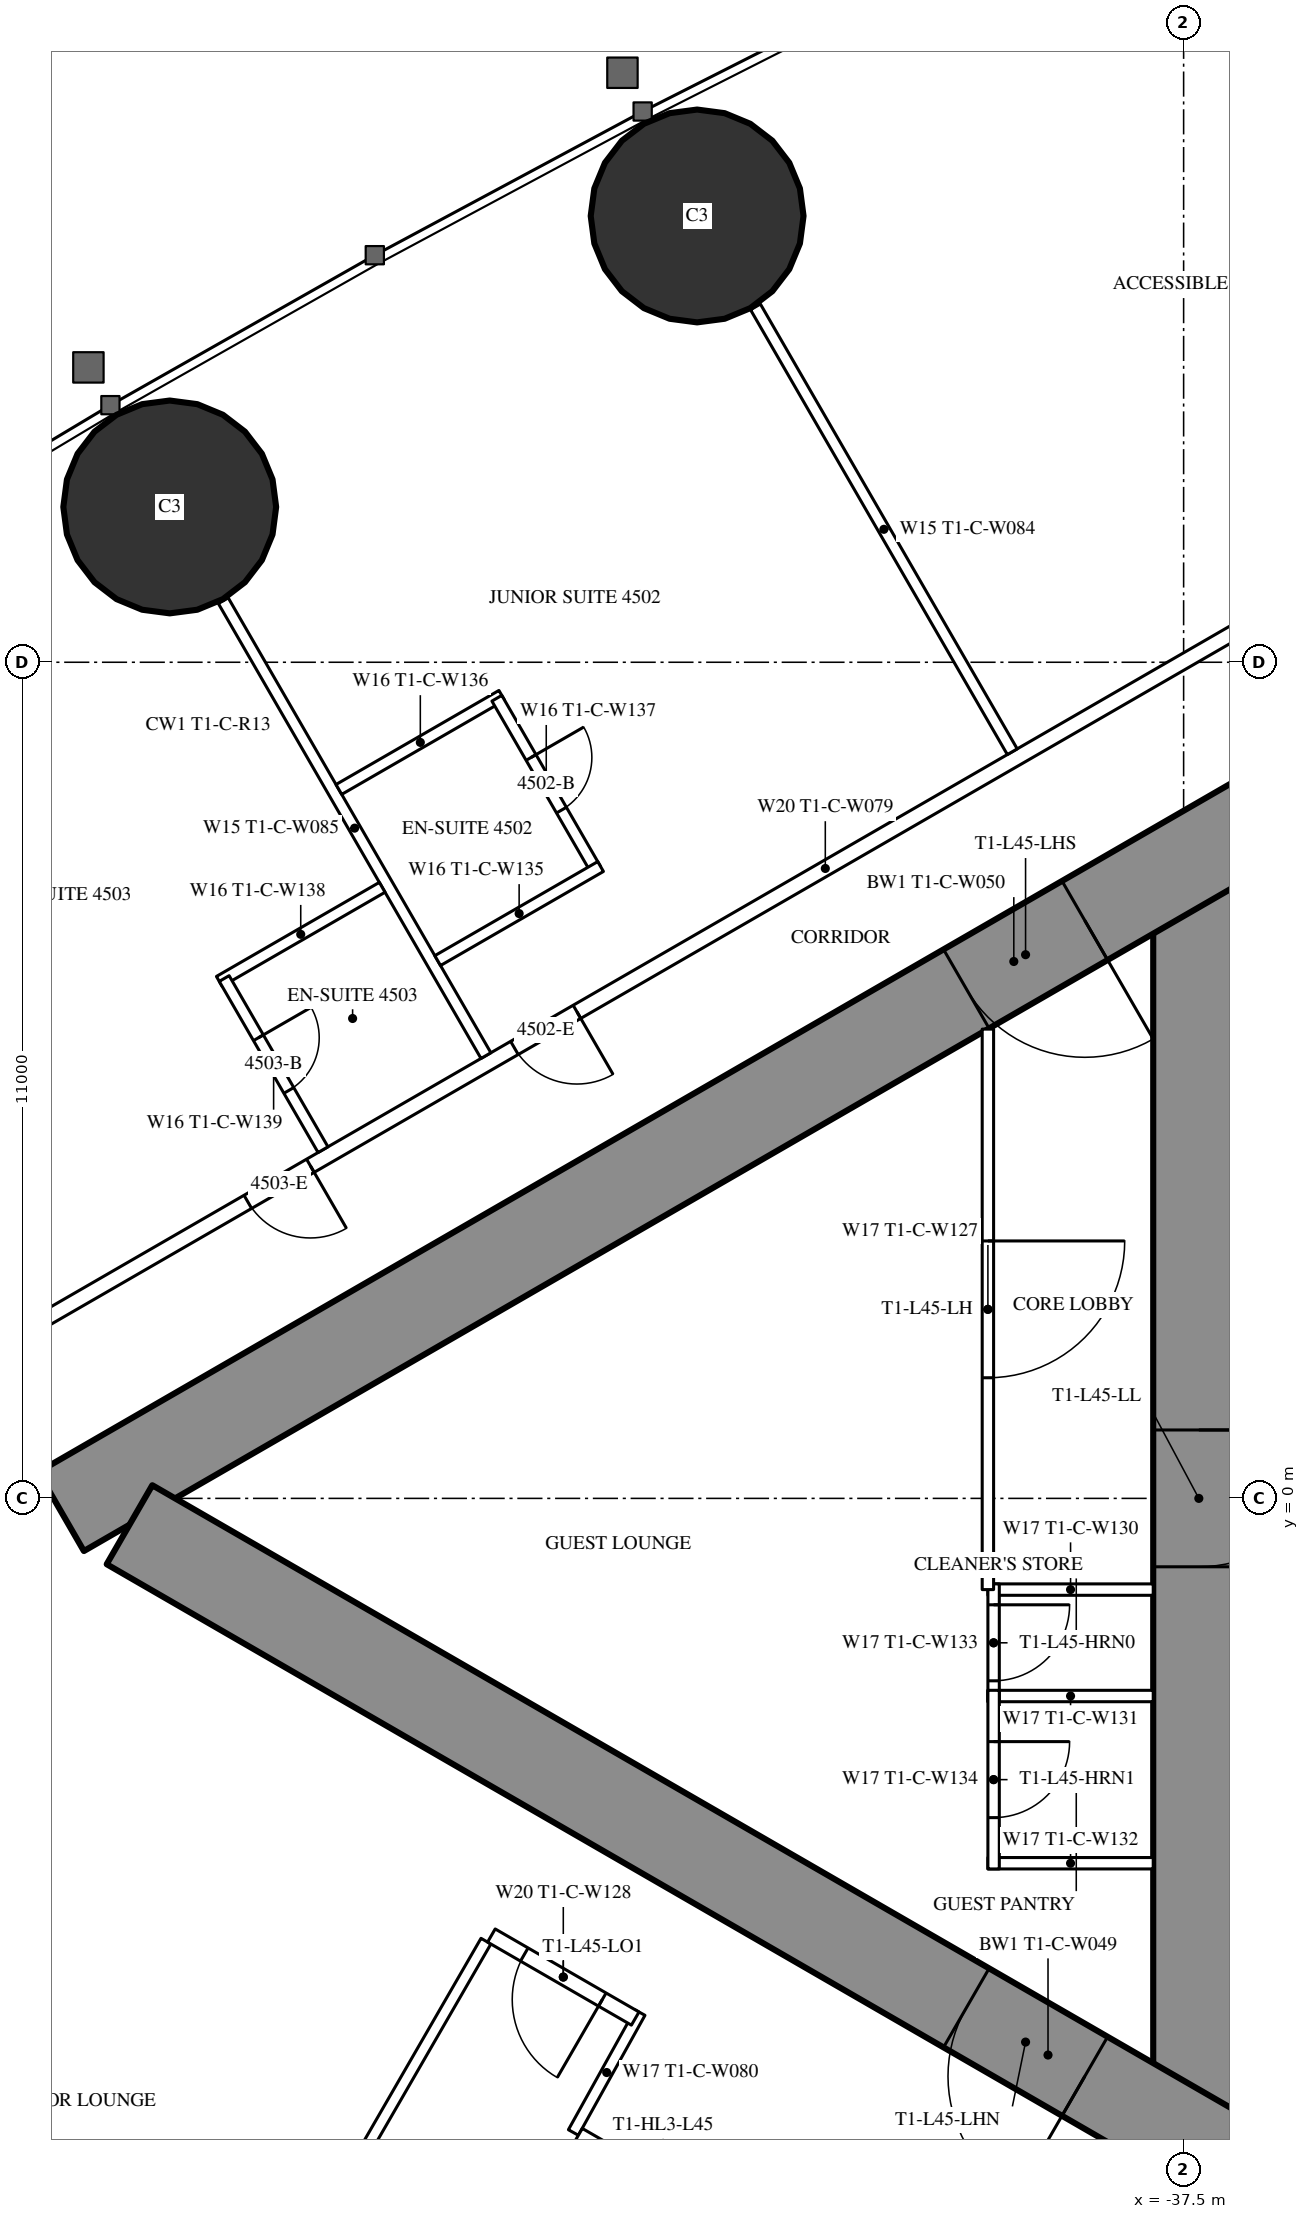
"""IFC4 building model, lengths in metres.
Left out: names, types, materials, properties, quantities, classifications, styles, units other than length and angle.
Written with IfcOpenShell. Run it as: python <this file> out.ifc"""

import sys

from ifc_helpers import new_model, si_unit, direction, frame, frame_2d, origin, origin_2d, place, context, subcontext, project, spatial, rectangle, circle, extrude, element, fill, save


model = new_model("IFC4")
c1 = context("Model", 3, precision=1e-05, world=origin(), true_north=direction((0.0, 1.0)))
c2 = subcontext(c1, "Body", "Model", "MODEL_VIEW")
j1 = project(units=[si_unit("LENGTHUNIT", "METRE"), si_unit("PLANEANGLEUNIT", "RADIAN")], contexts=[c1])
p1 = place(None, origin())
s1 = spatial("IfcSite", under=j1, at=p1, CompositionType="ELEMENT")
p2 = place(p1, origin())
s2 = spatial("IfcBuilding", under=s1, at=p2, CompositionType="ELEMENT")
p3 = place(p2, frame((0.0, 0.0, 170.3)))
s3 = spatial("IfcBuildingStorey", under=s2, at=p3, CompositionType="ELEMENT", Elevation=170.3)
for number, where, z_axis, x_axis in (
    (1, (-43.9, 16.871, 0.0), (0.0, 0.0, 1.0), (1.0, 0.0, 0.0)),
    (2, (-50.839, 13.043, 0.0), (0.0, 0.0, 1.0), (1.0, 0.0, 0.0)),
):
    element("IfcColumn", number, at=place(p3, frame(where, z_axis=z_axis, x_axis=x_axis)), inside=s3, PredefinedType="COLUMN", context=c2, shape_type="SweptSolid", body=[
        extrude(circle(Radius=1.4, at=origin_2d()), origin(), (0.0, 0.0, 1.0), 3.5),
    ])
p4 = place(p3, frame((-37.3, 8.6, 0.0), z_axis=(0.0, 0.0, 1.0), x_axis=(0.0, -1.0, 0.0)))
e3 = element("IfcWall", 3, at=p4, inside=s3, PredefinedType="SHEAR", context=c2, shape_type="SweptSolid", body=[
    extrude(rectangle(XDim=17.2, YDim=1.2, at=frame_2d((8.6, 0.0))), origin(), (0.0, 0.0, 1.0), 3.5),
])
p5 = place(p4, frame((7.7, 0.0, 0.0)))
e4 = element("IfcOpeningElement", 4, at=p5, cuts=e3, PredefinedType="OPENING", context=c2, shape_type="SweptSolid", body=[
    extrude(rectangle(XDim=1.8, YDim=2.2, at=frame_2d((0.9, 1.1))), frame((0.0, 0.61, 0.0), z_axis=(0.0, -1.0, 0.0), x_axis=(1.0, 0.0, 0.0)), (0.0, 0.0, 1.0), 1.22),
])
p6 = place(p3, frame((-27.2, 14.3, 0.0), z_axis=(0.0, 0.0, 1.0), x_axis=(-0.866026593062, -0.499997940104, 0.0)))
e5 = element("IfcWall", 5, at=p6, inside=s3, PredefinedType="SHEAR", context=c2, shape_type="SweptSolid", body=[
    extrude(rectangle(XDim=28.946, YDim=1.2, at=frame_2d((14.473, 0.0))), origin(), (0.0, 0.0, 1.0), 3.5),
])
p7 = place(p6, frame((4.6, 0.0, 0.0)))
e6 = element("IfcOpeningElement", 6, at=p7, cuts=e5, PredefinedType="OPENING", context=c2, shape_type="SweptSolid", body=[
    extrude(rectangle(XDim=1.0, YDim=2.2, at=frame_2d((0.5, 1.1))), frame((0.0, 0.61, 0.0), z_axis=(0.0, -1.0, 0.0), x_axis=(1.0, 0.0, 0.0)), (0.0, 0.0, 1.0), 1.22),
])
p8 = place(p6, frame((13.395, 0.0, 0.0)))
e7 = element("IfcOpeningElement", 7, at=p8, cuts=e5, PredefinedType="OPENING", context=c2, shape_type="SweptSolid", body=[
    extrude(rectangle(XDim=1.8, YDim=2.2, at=frame_2d((0.9, 1.1))), frame((0.0, 0.61, 0.0), z_axis=(0.0, -1.0, 0.0), x_axis=(1.0, 0.0, 0.0)), (0.0, 0.0, 1.0), 1.22),
])
p9 = place(p3, frame((-27.2, -14.3, 0.0), z_axis=(0.0, 0.0, 1.0), x_axis=(-0.866024021859, 0.500002393557, 0.0)))
e8 = element("IfcWall", 8, at=p9, inside=s3, PredefinedType="SHEAR", context=c2, shape_type="SweptSolid", body=[
    extrude(rectangle(XDim=27.907, YDim=1.2, at=frame_2d((13.954, 0.0))), origin(), (0.0, 0.0, 1.0), 3.5),
])
p10 = place(p9, frame((4.6, 0.0, 0.0)))
e9 = element("IfcOpeningElement", 9, at=p10, cuts=e8, PredefinedType="OPENING", context=c2, shape_type="SweptSolid", body=[
    extrude(rectangle(XDim=1.0, YDim=2.2, at=frame_2d((0.5, 1.1))), frame((0.0, 0.61, 0.0), z_axis=(0.0, -1.0, 0.0), x_axis=(1.0, 0.0, 0.0)), (0.0, 0.0, 1.0), 1.22),
])
p11 = place(p9, frame((13.395, 0.0, 0.0)))
e10 = element("IfcOpeningElement", 10, at=p11, cuts=e8, PredefinedType="OPENING", context=c2, shape_type="SweptSolid", body=[
    extrude(rectangle(XDim=1.8, YDim=2.2, at=frame_2d((0.9, 1.1))), frame((0.0, 0.61, 0.0), z_axis=(0.0, -1.0, 0.0), x_axis=(1.0, 0.0, 0.0)), (0.0, 0.0, 1.0), 1.22),
])
p12 = place(p3, frame((-27.86, 16.575, 0.0), z_axis=(0.0, 0.0, 1.0), x_axis=(-0.866025533911, -0.499999774615, 0.0)))
e11 = element("IfcWall", 11, at=p12, inside=s3, PredefinedType="PARTITIONING", context=c2, shape_type="SweptSolid", body=[
    extrude(rectangle(XDim=33.149, YDim=0.2, at=frame_2d((16.575, 0.0))), origin(), (0.0, 0.0, 1.0), 3.25),
])
p13 = place(p12, frame((3.75, 0.0, 0.0)))
e12 = element("IfcOpeningElement", 12, at=p13, cuts=e11, PredefinedType="OPENING", context=c2, shape_type="SweptSolid", body=[
    extrude(rectangle(XDim=1.0, YDim=2.2, at=frame_2d((0.5, 1.1))), frame((0.0, 0.11, 0.0), z_axis=(0.0, -1.0, 0.0), x_axis=(1.0, 0.0, 0.0)), (0.0, 0.0, 1.0), 0.22),
])
p14 = place(p12, frame((20.347, 0.0, 0.0)))
e13 = element("IfcOpeningElement", 13, at=p14, cuts=e11, PredefinedType="OPENING", context=c2, shape_type="SweptSolid", body=[
    extrude(rectangle(XDim=0.95, YDim=2.2, at=frame_2d((0.475, 1.1))), frame((0.0, 0.11, 0.0), z_axis=(0.0, -1.0, 0.0), x_axis=(1.0, 0.0, 0.0)), (0.0, 0.0, 1.0), 0.22),
])
p15 = place(p12, frame((24.397, 0.0, 0.0)))
e14 = element("IfcOpeningElement", 14, at=p15, cuts=e11, PredefinedType="OPENING", context=c2, shape_type="SweptSolid", body=[
    extrude(rectangle(XDim=0.95, YDim=2.2, at=frame_2d((0.475, 1.1))), frame((0.0, 0.11, 0.0), z_axis=(0.0, -1.0, 0.0), x_axis=(1.0, 0.0, 0.0)), (0.0, 0.0, 1.0), 0.22),
])
p16 = place(p12, frame((30.042, 0.0, 0.0)))
e15 = element("IfcOpeningElement", 15, at=p16, cuts=e11, PredefinedType="OPENING", context=c2, shape_type="SweptSolid", body=[
    extrude(rectangle(XDim=0.95, YDim=2.2, at=frame_2d((0.475, 1.1))), frame((0.0, 0.11, 0.0), z_axis=(0.0, -1.0, 0.0), x_axis=(1.0, 0.0, 0.0)), (0.0, 0.0, 1.0), 0.22),
])
p17 = place(p3, frame((-39.754, 9.823, 0.0), z_axis=(0.0, 0.0, 1.0), x_axis=(-0.499997670926, 0.866026748472, 0.0)))
e16 = element("IfcWall", 16, at=p17, inside=s3, PredefinedType="PARTITIONING", context=c2, shape_type="SweptSolid", body=[
    extrude(rectangle(XDim=6.757, YDim=0.15, at=frame_2d((3.379, 0.0))), origin(), (0.0, 0.0, 1.0), 2.3),
])
for number, where, z_axis, x_axis in (
    (17, (-46.679, 5.825, 0.0), (0.0, 0.0, 1.0), (-0.5, 0.866, 0.0)),
    (18, (-46.679, -5.825, 0.0), (0.0, 0.0, 1.0), (-0.5, -0.866, 0.0)),
):
    element("IfcWall", number, at=place(p3, frame(where, z_axis=z_axis, x_axis=x_axis)), inside=s3, PredefinedType="PARTITIONING", context=c2, shape_type="SweptSolid", body=[
        extrude(rectangle(XDim=6.911, YDim=0.15, at=frame_2d((3.456, 0.0))), origin(), (0.0, 0.0, 1.0), 2.3),
    ])
p18 = place(p3, frame((-44.652, -6.764, 0.0), z_axis=(0.0, 0.0, 1.0), x_axis=(-0.485424724123, -0.874278466629, 0.0)))
e19 = element("IfcWall", 19, at=p18, inside=s3, PredefinedType="PARTITIONING", context=c2, shape_type="SweptSolid", body=[
    extrude(rectangle(XDim=1.805, YDim=0.15, at=frame_2d((0.903, 0.0))), origin(), (0.0, 0.0, 1.0), 3.25),
])
p19 = place(p3, frame((-44.715, -6.844, 0.0), z_axis=(0.0, 0.0, 1.0), x_axis=(-0.865999496279, 0.500044870432, 0.0)))
e20 = element("IfcWall", 20, at=p19, inside=s3, PredefinedType="PARTITIONING", context=c2, shape_type="SweptSolid", body=[
    extrude(rectangle(XDim=2.185, YDim=0.2, at=frame_2d((1.092, 0.0))), origin(), (0.0, 0.0, 1.0), 3.25),
])
p20 = place(p19, frame((0.5, 0.0, 0.0)))
e21 = element("IfcOpeningElement", 21, at=p20, cuts=e20, PredefinedType="OPENING", context=c2, shape_type="SweptSolid", body=[
    extrude(rectangle(XDim=1.185, YDim=2.2, at=frame_2d((0.593, 1.1))), frame((0.0, 0.11, 0.0), z_axis=(0.0, -1.0, 0.0), x_axis=(1.0, 0.0, 0.0)), (0.0, 0.0, 1.0), 0.22),
])
p21 = place(p3, frame((-46.47, 10.564, 0.0), z_axis=(0.0, 0.0, 1.0), x_axis=(-0.866006523861, -0.500032699561, 0.0)))
e22 = element("IfcWall", 22, at=p21, inside=s3, PredefinedType="PARTITIONING", context=c2, shape_type="SweptSolid", body=[
    extrude(rectangle(XDim=2.475, YDim=0.15, at=frame_2d((1.237, 0.0))), origin(), (0.0, 0.0, 1.0), 3.25),
])
p22 = place(p3, frame((-45.235, 8.275, 0.0), z_axis=(0.0, 0.0, 1.0), x_axis=(-0.500006934395, 0.866021400173, 0.0)))
e23 = element("IfcWall", 23, at=p22, inside=s3, PredefinedType="PARTITIONING", context=c2, shape_type="SweptSolid", body=[
    extrude(rectangle(XDim=2.6, YDim=0.15, at=frame_2d((1.3, 0.0))), origin(), (0.0, 0.0, 1.0), 3.25),
])
p23 = place(p22, frame((0.9, 0.0, 0.0)))
e24 = element("IfcOpeningElement", 24, at=p23, cuts=e23, PredefinedType="OPENING", context=c2, shape_type="SweptSolid", body=[
    extrude(rectangle(XDim=0.8, YDim=2.2, at=frame_2d((0.4, 1.1))), frame((0.0, 0.085, 0.0), z_axis=(0.0, -1.0, 0.0), x_axis=(1.0, 0.0, 0.0)), (0.0, 0.0, 1.0), 0.17),
])
for number, where, z_axis, x_axis in (
    (25, (-45.17, 8.312, 0.0), (0.0, 0.0, 1.0), (-0.866, -0.5, 0.0)),
    (26, (-48.044, 8.039, 0.0), (0.0, 0.0, 1.0), (-0.866, -0.5, 0.0)),
):
    element("IfcWall", number, at=place(p3, frame(where, z_axis=z_axis, x_axis=x_axis)), inside=s3, PredefinedType="PARTITIONING", context=c2, shape_type="SweptSolid", body=[
        extrude(rectangle(XDim=2.475, YDim=0.15, at=frame_2d((1.238, 0.0))), origin(), (0.0, 0.0, 1.0), 3.25),
    ])
p24 = place(p3, frame((-48.822, 4.588, 0.0), z_axis=(0.0, 0.0, 1.0), x_axis=(-0.500006934395, 0.866021400173, 0.0)))
e27 = element("IfcWall", 27, at=p24, inside=s3, PredefinedType="PARTITIONING", context=c2, shape_type="SweptSolid", body=[
    extrude(rectangle(XDim=2.6, YDim=0.15, at=frame_2d((1.3, 0.0))), origin(), (0.0, 0.0, 1.0), 3.25),
])
p25 = place(p24, frame((0.9, 0.0, 0.0)))
e28 = element("IfcOpeningElement", 28, at=p25, cuts=e27, PredefinedType="OPENING", context=c2, shape_type="SweptSolid", body=[
    extrude(rectangle(XDim=0.8, YDim=2.2, at=frame_2d((0.4, 1.1))), frame((0.0, 0.085, 0.0), z_axis=(0.0, -1.0, 0.0), x_axis=(1.0, 0.0, 0.0)), (0.0, 0.0, 1.0), 0.17),
])
for number, where, z_axis, x_axis in (
    (29, (-37.9, -1.2, 0.0), (0.0, 0.0, 1.0), (-1.0, 0.0, 0.0)),
    (30, (-37.9, -2.6, 0.0), (0.0, 0.0, 1.0), (-1.0, 0.0, 0.0)),
    (31, (-37.9, -4.8, 0.0), (0.0, 0.0, 1.0), (-1.0, 0.0, 0.0)),
):
    element("IfcWall", number, at=place(p3, frame(where, z_axis=z_axis, x_axis=x_axis)), inside=s3, PredefinedType="PARTITIONING", context=c2, shape_type="SweptSolid", body=[
        extrude(rectangle(XDim=2.175, YDim=0.15, at=frame_2d((1.087, 0.0))), origin(), (0.0, 0.0, 1.0), 3.25),
    ])
p26 = place(p3, frame((-40.0, -1.125, 0.0), z_axis=(0.0, 0.0, 1.0), x_axis=(0.0, -1.0, 0.0)))
e32 = element("IfcWall", 32, at=p26, inside=s3, PredefinedType="PARTITIONING", context=c2, shape_type="SweptSolid", body=[
    extrude(rectangle(XDim=1.55, YDim=0.15, at=frame_2d((0.775, 0.0))), origin(), (0.0, 0.0, 1.0), 3.25),
])
p27 = place(p26, frame((0.275, 0.0, 0.0)))
e33 = element("IfcOpeningElement", 33, at=p27, cuts=e32, PredefinedType="OPENING", context=c2, shape_type="SweptSolid", body=[
    extrude(rectangle(XDim=1.0, YDim=2.2, at=frame_2d((0.5, 1.1))), frame((0.0, 0.085, 0.0), z_axis=(0.0, -1.0, 0.0), x_axis=(1.0, 0.0, 0.0)), (0.0, 0.0, 1.0), 0.17),
])
p28 = place(p3, frame((-40.0, -2.525, 0.0), z_axis=(0.0, 0.0, 1.0), x_axis=(0.0, -1.0, 0.0)))
e34 = element("IfcWall", 34, at=p28, inside=s3, PredefinedType="PARTITIONING", context=c2, shape_type="SweptSolid", body=[
    extrude(rectangle(XDim=2.35, YDim=0.15, at=frame_2d((1.175, 0.0))), origin(), (0.0, 0.0, 1.0), 3.25),
])
p29 = place(p28, frame((0.675, 0.0, 0.0)))
e35 = element("IfcOpeningElement", 35, at=p29, cuts=e34, PredefinedType="OPENING", context=c2, shape_type="SweptSolid", body=[
    extrude(rectangle(XDim=1.0, YDim=2.2, at=frame_2d((0.5, 1.1))), frame((0.0, 0.085, 0.0), z_axis=(0.0, -1.0, 0.0), x_axis=(1.0, 0.0, 0.0)), (0.0, 0.0, 1.0), 0.17),
])
p30 = place(p3, frame((-40.075, 6.174, 0.0), z_axis=(0.0, 0.0, 1.0), x_axis=(0.0, -1.0, 0.0)))
e36 = element("IfcWall", 36, at=p30, inside=s3, PredefinedType="PARTITIONING", context=c2, shape_type="SweptSolid", body=[
    extrude(rectangle(XDim=7.374, YDim=0.15, at=frame_2d((3.687, 0.0))), origin(), (0.0, 0.0, 1.0), 3.25),
])
p31 = place(p30, frame((2.787, 0.0, 0.0)))
e37 = element("IfcOpeningElement", 37, at=p31, cuts=e36, PredefinedType="OPENING", context=c2, shape_type="SweptSolid", body=[
    extrude(rectangle(XDim=1.8, YDim=2.2, at=frame_2d((0.9, 1.1))), frame((0.0, 0.085, 0.0), z_axis=(0.0, -1.0, 0.0), x_axis=(1.0, 0.0, 0.0)), (0.0, 0.0, 1.0), 0.17),
])
p32 = place(p3, frame((-39.758, -11.697, 0.0), z_axis=(0.0, 0.0, 1.0), x_axis=(-0.866024194504, 0.500002094529, 0.0)))
e38 = element("IfcWall", 38, at=p32, inside=s3, PredefinedType="PARTITIONING", context=c2, shape_type="SweptSolid", body=[
    extrude(rectangle(XDim=6.6, YDim=0.25, at=frame_2d((3.3, 0.0))), origin(), (0.0, 0.0, 1.0), 3.25),
])
p33 = place(p32, frame((0.75, 0.0, 0.0)))
e39 = element("IfcOpeningElement", 39, at=p33, cuts=e38, PredefinedType="OPENING", context=c2, shape_type="SweptSolid", body=[
    extrude(rectangle(XDim=1.1, YDim=2.2, at=frame_2d((0.55, 1.1))), frame((0.0, 0.135, 0.0), z_axis=(0.0, -1.0, 0.0), x_axis=(1.0, 0.0, 0.0)), (0.0, 0.0, 1.0), 0.27),
])
p34 = place(p32, frame((2.75, 0.0, 0.0)))
e40 = element("IfcOpeningElement", 40, at=p34, cuts=e38, PredefinedType="OPENING", context=c2, shape_type="SweptSolid", body=[
    extrude(rectangle(XDim=1.1, YDim=2.2, at=frame_2d((0.55, 1.1))), frame((0.0, 0.135, 0.0), z_axis=(0.0, -1.0, 0.0), x_axis=(1.0, 0.0, 0.0)), (0.0, 0.0, 1.0), 0.27),
])
p35 = place(p32, frame((4.75, 0.0, 0.0)))
e41 = element("IfcOpeningElement", 41, at=p35, cuts=e38, PredefinedType="OPENING", context=c2, shape_type="SweptSolid", body=[
    extrude(rectangle(XDim=1.1, YDim=2.2, at=frame_2d((0.55, 1.1))), frame((0.0, 0.135, 0.0), z_axis=(0.0, -1.0, 0.0), x_axis=(1.0, 0.0, 0.0)), (0.0, 0.0, 1.0), 0.27),
])
p36 = place(p23, origin())
e42 = element("IfcDoor", 42, at=p36, inside=s3, OperationType="SINGLE_SWING_RIGHT", PredefinedType="DOOR", context=c2, shape_type="SweptSolid", body=[
    extrude(rectangle(XDim=0.8, YDim=2.2, at=frame_2d((0.4, 1.1))), frame((0.0, 0.025, 0.0), z_axis=(0.0, -1.0, 0.0), x_axis=(1.0, 0.0, 0.0)), (0.0, 0.0, 1.0), 0.05),
])
fill(e24, e42)
p37 = place(p14, origin())
e43 = element("IfcDoor", 43, at=p37, inside=s3, OperationType="SINGLE_SWING_LEFT", PredefinedType="DOOR", context=c2, shape_type="SweptSolid", body=[
    extrude(rectangle(XDim=0.95, YDim=2.2, at=frame_2d((0.475, 1.1))), frame((0.0, 0.025, 0.0), z_axis=(0.0, -1.0, 0.0), x_axis=(1.0, 0.0, 0.0)), (0.0, 0.0, 1.0), 0.05),
])
fill(e13, e43)
p38 = place(p25, origin())
e44 = element("IfcDoor", 44, at=p38, inside=s3, OperationType="SINGLE_SWING_RIGHT", PredefinedType="DOOR", context=c2, shape_type="SweptSolid", body=[
    extrude(rectangle(XDim=0.8, YDim=2.2, at=frame_2d((0.4, 1.1))), frame((0.0, 0.025, 0.0), z_axis=(0.0, -1.0, 0.0), x_axis=(1.0, 0.0, 0.0)), (0.0, 0.0, 1.0), 0.05),
])
fill(e28, e44)
p39 = place(p15, origin())
e45 = element("IfcDoor", 45, at=p39, inside=s3, OperationType="SINGLE_SWING_LEFT", PredefinedType="DOOR", context=c2, shape_type="SweptSolid", body=[
    extrude(rectangle(XDim=0.95, YDim=2.2, at=frame_2d((0.475, 1.1))), frame((0.0, 0.025, 0.0), z_axis=(0.0, -1.0, 0.0), x_axis=(1.0, 0.0, 0.0)), (0.0, 0.0, 1.0), 0.05),
])
fill(e14, e45)
p40 = place(p20, origin())
e46 = element("IfcDoor", 46, at=p40, inside=s3, OperationType="SINGLE_SWING_LEFT", PredefinedType="DOOR", context=c2, shape_type="SweptSolid", body=[
    extrude(rectangle(XDim=1.185, YDim=2.2, at=frame_2d((0.593, 1.1))), frame((0.0, 0.025, 0.0), z_axis=(0.0, -1.0, 0.0), x_axis=(1.0, 0.0, 0.0)), (0.0, 0.0, 1.0), 0.05),
])
fill(e21, e46)
p41 = place(p27, origin())
e47 = element("IfcDoor", 47, at=p41, inside=s3, OperationType="SINGLE_SWING_LEFT", PredefinedType="DOOR", context=c2, shape_type="SweptSolid", body=[
    extrude(rectangle(XDim=1.0, YDim=2.2, at=frame_2d((0.5, 1.1))), frame((0.0, 0.025, 0.0), z_axis=(0.0, -1.0, 0.0), x_axis=(1.0, 0.0, 0.0)), (0.0, 0.0, 1.0), 0.05),
])
fill(e33, e47)
p42 = place(p29, origin())
e48 = element("IfcDoor", 48, at=p42, inside=s3, OperationType="SINGLE_SWING_LEFT", PredefinedType="DOOR", context=c2, shape_type="SweptSolid", body=[
    extrude(rectangle(XDim=1.0, YDim=2.2, at=frame_2d((0.5, 1.1))), frame((0.0, 0.025, 0.0), z_axis=(0.0, -1.0, 0.0), x_axis=(1.0, 0.0, 0.0)), (0.0, 0.0, 1.0), 0.05),
])
fill(e35, e48)
p43 = place(p31, origin())
e49 = element("IfcDoor", 49, at=p43, inside=s3, OperationType="DOUBLE_DOOR_SINGLE_SWING", PredefinedType="DOOR", context=c2, shape_type="SweptSolid", body=[
    extrude(rectangle(XDim=1.8, YDim=2.2, at=frame_2d((0.9, 1.1))), frame((0.0, 0.025, 0.0), z_axis=(0.0, -1.0, 0.0), x_axis=(1.0, 0.0, 0.0)), (0.0, 0.0, 1.0), 0.05),
])
fill(e37, e49)
p44 = place(p8, origin())
e50 = element("IfcDoor", 50, at=p44, inside=s3, OperationType="DOUBLE_DOOR_SINGLE_SWING", PredefinedType="DOOR", context=c2, shape_type="SweptSolid", body=[
    extrude(rectangle(XDim=1.8, YDim=2.2, at=frame_2d((0.9, 1.1))), frame((0.0, 0.025, 0.0), z_axis=(0.0, -1.0, 0.0), x_axis=(1.0, 0.0, 0.0)), (0.0, 0.0, 1.0), 0.05),
])
fill(e7, e50)
p45 = place(p11, origin())
e51 = element("IfcDoor", 51, at=p45, inside=s3, OperationType="DOUBLE_DOOR_SINGLE_SWING", PredefinedType="DOOR", context=c2, shape_type="SweptSolid", body=[
    extrude(rectangle(XDim=1.8, YDim=2.2, at=frame_2d((0.9, 1.1))), frame((0.0, 0.025, 0.0), z_axis=(0.0, -1.0, 0.0), x_axis=(1.0, 0.0, 0.0)), (0.0, 0.0, 1.0), 0.05),
])
fill(e10, e51)
p46 = place(p5, origin())
e52 = element("IfcDoor", 52, at=p46, inside=s3, OperationType="DOUBLE_DOOR_SINGLE_SWING", PredefinedType="DOOR", context=c2, shape_type="SweptSolid", body=[
    extrude(rectangle(XDim=1.8, YDim=2.2, at=frame_2d((0.9, 1.1))), frame((0.0, 0.025, 0.0), z_axis=(0.0, -1.0, 0.0), x_axis=(1.0, 0.0, 0.0)), (0.0, 0.0, 1.0), 0.05),
])
fill(e4, e52)
save(model, sys.argv[1])
